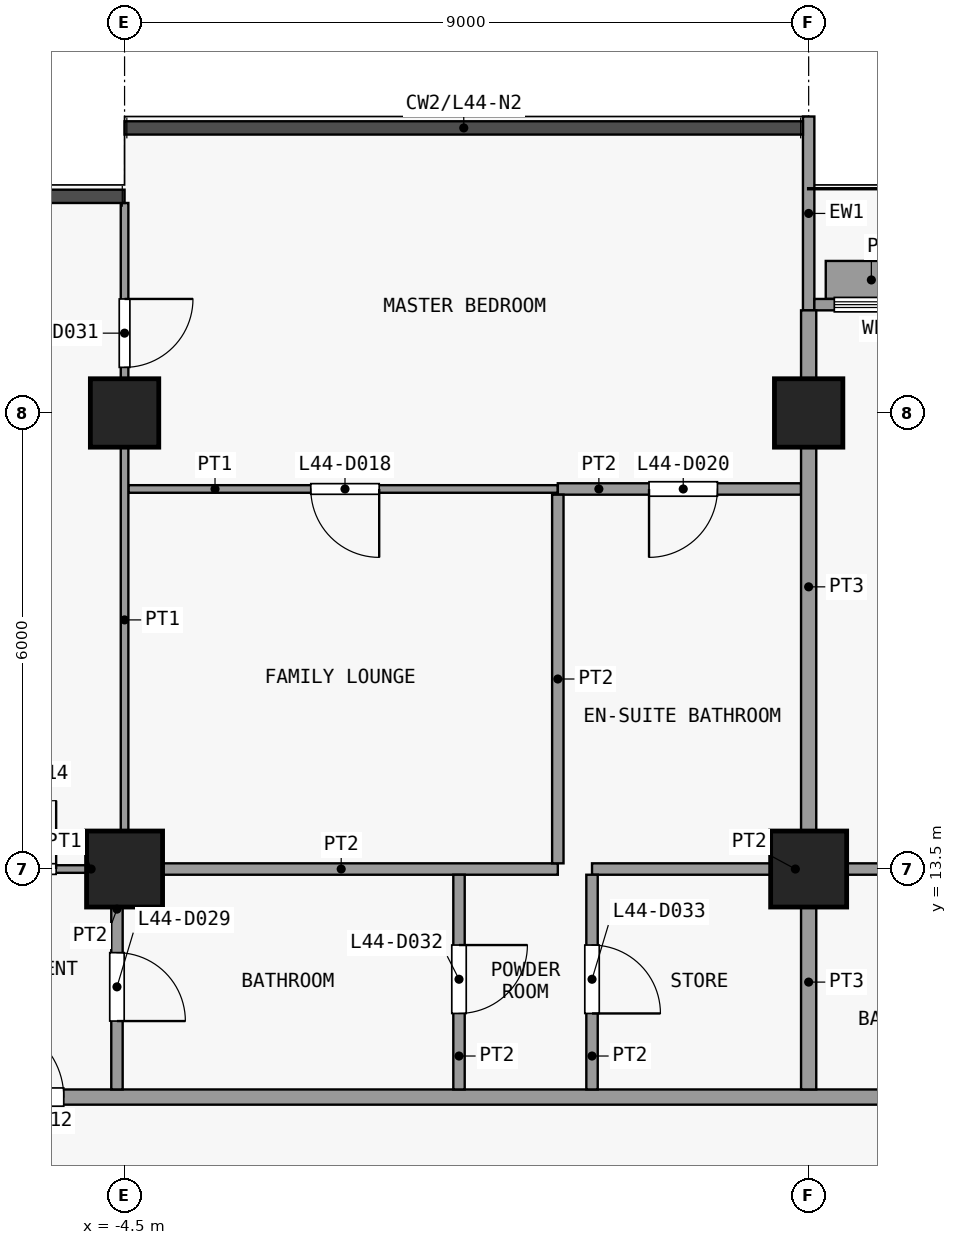
"""IFC4 building model, lengths in metres.
Left out: names, types, materials, properties, quantities, classifications, styles, units other than length and angle.
Written with IfcOpenShell. Run it as: python <this file> out.ifc"""

import sys

from ifc_helpers import new_model, si_unit, direction, frame, frame_2d, origin, origin_2d, place, context, subcontext, project, spatial, rectangle, extrude, element, fill, save


model = new_model("IFC4")
c1 = context("Model", 3, precision=1e-05, world=origin(), true_north=direction((0.0, 1.0)))
c2 = subcontext(c1, "Body", "Model", "MODEL_VIEW")
j1 = project(units=[si_unit("LENGTHUNIT", "METRE"), si_unit("PLANEANGLEUNIT", "RADIAN")], contexts=[c1])
p1 = place(None, origin())
s1 = spatial("IfcSite", under=j1, at=p1, CompositionType="ELEMENT")
p2 = place(p1, origin())
s2 = spatial("IfcBuilding", under=s1, at=p2, CompositionType="ELEMENT")
p3 = place(p2, frame((0.0, 0.0, 178.1)))
s3 = spatial("IfcBuildingStorey", under=s2, at=p3, CompositionType="ELEMENT", Elevation=178.1)
p4 = place(p3, frame((-4.5, 13.5, 0.0), z_axis=(0.0, 0.0, 1.0), x_axis=(1.0, 0.0, 0.0)))
e1 = element("IfcColumn", 1, at=p4, inside=s3, PredefinedType="COLUMN", context=c2, shape_type="SweptSolid", body=[
    extrude(rectangle(XDim=1.0, YDim=1.0, at=origin_2d()), origin(), (0.0, 0.0, 1.0), 3.6),
])
p5 = place(p3, frame((-4.5, 19.5, 0.0), z_axis=(0.0, 0.0, 1.0), x_axis=(1.0, 0.0, 0.0)))
e2 = element("IfcColumn", 2, at=p5, inside=s3, PredefinedType="COLUMN", context=c2, shape_type="SweptSolid", body=[
    extrude(rectangle(XDim=0.9, YDim=0.9, at=origin_2d()), origin(), (0.0, 0.0, 1.0), 3.6),
])
p6 = place(p3, frame((4.5, 13.5, 0.0), z_axis=(0.0, 0.0, 1.0), x_axis=(1.0, 0.0, 0.0)))
e3 = element("IfcColumn", 3, at=p6, inside=s3, PredefinedType="COLUMN", context=c2, shape_type="SweptSolid", body=[
    extrude(rectangle(XDim=1.0, YDim=1.0, at=origin_2d()), origin(), (0.0, 0.0, 1.0), 3.6),
])
p7 = place(p3, frame((4.5, 19.5, 0.0), z_axis=(0.0, 0.0, 1.0), x_axis=(1.0, 0.0, 0.0)))
e4 = element("IfcColumn", 4, at=p7, inside=s3, PredefinedType="COLUMN", context=c2, shape_type="SweptSolid", body=[
    extrude(rectangle(XDim=0.9, YDim=0.9, at=origin_2d()), origin(), (0.0, 0.0, 1.0), 3.6),
])
p8 = place(p3, frame((4.5, 20.85, 0.0), z_axis=(0.0, 0.0, 1.0), x_axis=(0.0, 1.0, 0.0)))
e5 = element("IfcWall", 5, at=p8, inside=s3, PredefinedType="SOLIDWALL", context=c2, shape_type="SweptSolid", body=[
    extrude(rectangle(XDim=2.55, YDim=0.15, at=frame_2d((1.275, 0.0))), origin(), (0.0, 0.0, 1.0), 3.3),
])
p9 = place(p3, frame((4.575, 20.925, 0.0), z_axis=(0.0, 0.0, 1.0), x_axis=(1.0, 0.0, 0.0)))
e6 = element("IfcWall", 6, at=p9, inside=s3, PredefinedType="SOLIDWALL", context=c2, shape_type="SweptSolid", body=[
    extrude(rectangle(XDim=5.85, YDim=0.15, at=frame_2d((2.925, 0.0))), origin(), (0.0, 0.0, 1.0), 3.3),
])
p10 = place(p9, frame((2.325, 0.0, 0.0)))
e7 = element("IfcOpeningElement", 7, at=p10, cuts=e6, PredefinedType="OPENING", context=c2, shape_type="SweptSolid", body=[
    extrude(rectangle(XDim=1.2, YDim=2.4, at=frame_2d((0.6, 1.2))), frame((0.0, 0.085, 0.0), z_axis=(0.0, -1.0, 0.0), x_axis=(1.0, 0.0, 0.0)), (0.0, 0.0, 1.0), 0.17),
])
p11 = place(p9, frame((0.262, 0.0, 0.9)))
e8 = element("IfcOpeningElement", 8, at=p11, cuts=e6, PredefinedType="OPENING", context=c2, shape_type="SweptSolid", body=[
    extrude(rectangle(XDim=1.8, YDim=2.1, at=frame_2d((0.9, 1.05))), frame((0.0, 0.085, 0.0), z_axis=(0.0, -1.0, 0.0), x_axis=(1.0, 0.0, 0.0)), (0.0, 0.0, 1.0), 0.17),
])
p12 = place(p9, frame((3.788, 0.0, 0.9)))
e9 = element("IfcOpeningElement", 9, at=p12, cuts=e6, PredefinedType="OPENING", context=c2, shape_type="SweptSolid", body=[
    extrude(rectangle(XDim=1.8, YDim=2.1, at=frame_2d((0.9, 1.05))), frame((0.0, 0.085, 0.0), z_axis=(0.0, -1.0, 0.0), x_axis=(1.0, 0.0, 0.0)), (0.0, 0.0, 1.0), 0.17),
])
p13 = place(p3, frame((4.725, 21.25, 0.0), z_axis=(0.0, 0.0, 1.0), x_axis=(1.0, 0.0, 0.0)))
e10 = element("IfcWall", 10, at=p13, inside=s3, PredefinedType="USERDEFINED", context=c2, shape_type="SweptSolid", body=[
    extrude(rectangle(XDim=1.2, YDim=0.5, at=frame_2d((0.6, 0.0))), origin(), (0.0, 0.0, 1.0), 0.9),
])
p14 = place(p3, frame((-19.35, 10.5, 0.0), z_axis=(0.0, 0.0, 1.0), x_axis=(1.0, 0.0, 0.0)))
e11 = element("IfcWall", 11, at=p14, inside=s3, PredefinedType="PARTITIONING", context=c2, shape_type="SweptSolid", body=[
    extrude(rectangle(XDim=37.2, YDim=0.2, at=frame_2d((18.6, 0.0))), origin(), (0.0, 0.0, 1.0), 3.3),
])
p15 = place(p14, frame((13.05, 0.0, 0.0)))
e12 = element("IfcOpeningElement", 12, at=p15, cuts=e11, PredefinedType="OPENING", context=c2, shape_type="SweptSolid", body=[
    extrude(rectangle(XDim=1.0, YDim=2.1, at=frame_2d((0.5, 1.05))), frame((0.0, 0.11, 0.0), z_axis=(0.0, -1.0, 0.0), x_axis=(1.0, 0.0, 0.0)), (0.0, 0.0, 1.0), 0.22),
])
p16 = place(p14, frame((27.05, 0.0, 0.0)))
e13 = element("IfcOpeningElement", 13, at=p16, cuts=e11, PredefinedType="OPENING", context=c2, shape_type="SweptSolid", body=[
    extrude(rectangle(XDim=1.0, YDim=2.1, at=frame_2d((0.5, 1.05))), frame((0.0, 0.11, 0.0), z_axis=(0.0, -1.0, 0.0), x_axis=(1.0, 0.0, 0.0)), (0.0, 0.0, 1.0), 0.22),
])
p17 = place(p3, frame((-7.0, 13.5, 0.0), z_axis=(0.0, 0.0, 1.0), x_axis=(1.0, 0.0, 0.0)))
e14 = element("IfcWall", 14, at=p17, inside=s3, PredefinedType="PARTITIONING", context=c2, shape_type="SweptSolid", body=[
    extrude(rectangle(XDim=2.4, YDim=0.1, at=frame_2d((1.2, 0.0))), origin(), (0.0, 0.0, 1.0), 3.3),
])
p18 = place(p17, frame((0.7, 0.0, 0.0)))
e15 = element("IfcOpeningElement", 15, at=p18, cuts=e14, PredefinedType="OPENING", context=c2, shape_type="SweptSolid", body=[
    extrude(rectangle(XDim=0.9, YDim=2.1, at=frame_2d((0.45, 1.05))), frame((0.0, 0.06, 0.0), z_axis=(0.0, -1.0, 0.0), x_axis=(1.0, 0.0, 0.0)), (0.0, 0.0, 1.0), 0.12),
])
p19 = place(p3, frame((-4.5, 13.5, 0.0), z_axis=(0.0, 0.0, 1.0), x_axis=(1.0, 0.0, 0.0)))
e16 = element("IfcWall", 16, at=p19, inside=s3, PredefinedType="PARTITIONING", context=c2, shape_type="SweptSolid", body=[
    extrude(rectangle(XDim=5.7, YDim=0.15, at=frame_2d((2.85, 0.0))), origin(), (0.0, 0.0, 1.0), 3.3),
])
p20 = place(p3, frame((1.65, 13.5, 0.0), z_axis=(0.0, 0.0, 1.0), x_axis=(1.0, 0.0, 0.0)))
e17 = element("IfcWall", 17, at=p20, inside=s3, PredefinedType="PARTITIONING", context=c2, shape_type="SweptSolid", body=[
    extrude(rectangle(XDim=5.35, YDim=0.15, at=frame_2d((2.675, 0.0))), origin(), (0.0, 0.0, 1.0), 3.3),
])
p21 = place(p3, frame((-4.45, 18.5, 0.0), z_axis=(0.0, 0.0, 1.0), x_axis=(1.0, 0.0, 0.0)))
e18 = element("IfcWall", 18, at=p21, inside=s3, PredefinedType="PARTITIONING", context=c2, shape_type="SweptSolid", body=[
    extrude(rectangle(XDim=5.65, YDim=0.1, at=frame_2d((2.825, 0.0))), origin(), (0.0, 0.0, 1.0), 3.3),
])
p22 = place(p21, frame((2.4, 0.0, 0.0)))
e19 = element("IfcOpeningElement", 19, at=p22, cuts=e18, PredefinedType="OPENING", context=c2, shape_type="SweptSolid", body=[
    extrude(rectangle(XDim=0.9, YDim=2.1, at=frame_2d((0.45, 1.05))), frame((0.0, 0.06, 0.0), z_axis=(0.0, -1.0, 0.0), x_axis=(1.0, 0.0, 0.0)), (0.0, 0.0, 1.0), 0.12),
])
p23 = place(p3, frame((1.2, 18.5, 0.0), z_axis=(0.0, 0.0, 1.0), x_axis=(1.0, 0.0, 0.0)))
e20 = element("IfcWall", 20, at=p23, inside=s3, PredefinedType="PARTITIONING", context=c2, shape_type="SweptSolid", body=[
    extrude(rectangle(XDim=3.2, YDim=0.15, at=frame_2d((1.6, 0.0))), origin(), (0.0, 0.0, 1.0), 3.3),
])
p24 = place(p23, frame((1.2, 0.0, 0.0)))
e21 = element("IfcOpeningElement", 21, at=p24, cuts=e20, PredefinedType="OPENING", context=c2, shape_type="SweptSolid", body=[
    extrude(rectangle(XDim=0.9, YDim=2.1, at=frame_2d((0.45, 1.05))), frame((0.0, 0.085, 0.0), z_axis=(0.0, -1.0, 0.0), x_axis=(1.0, 0.0, 0.0)), (0.0, 0.0, 1.0), 0.17),
])
p25 = place(p3, frame((-4.6, 10.6, 0.0), z_axis=(0.0, 0.0, 1.0), x_axis=(0.0, 1.0, 0.0)))
e22 = element("IfcWall", 22, at=p25, inside=s3, PredefinedType="PARTITIONING", context=c2, shape_type="SweptSolid", body=[
    extrude(rectangle(XDim=2.825, YDim=0.15, at=frame_2d((1.413, 0.0))), origin(), (0.0, 0.0, 1.0), 3.3),
])
p26 = place(p25, frame((0.9, 0.0, 0.0)))
e23 = element("IfcOpeningElement", 23, at=p26, cuts=e22, PredefinedType="OPENING", context=c2, shape_type="SweptSolid", body=[
    extrude(rectangle(XDim=0.9, YDim=2.1, at=frame_2d((0.45, 1.05))), frame((0.0, 0.085, 0.0), z_axis=(0.0, -1.0, 0.0), x_axis=(1.0, 0.0, 0.0)), (0.0, 0.0, 1.0), 0.17),
])
p27 = place(p3, frame((-4.5, 13.575, 0.0), z_axis=(0.0, 0.0, 1.0), x_axis=(0.0, 1.0, 0.0)))
e24 = element("IfcWall", 24, at=p27, inside=s3, PredefinedType="PARTITIONING", context=c2, shape_type="SweptSolid", body=[
    extrude(rectangle(XDim=8.688, YDim=0.1, at=frame_2d((4.344, 0.0))), origin(), (0.0, 0.0, 1.0), 3.3),
])
p28 = place(p27, frame((6.525, 0.0, 0.0)))
e25 = element("IfcOpeningElement", 25, at=p28, cuts=e24, PredefinedType="OPENING", context=c2, shape_type="SweptSolid", body=[
    extrude(rectangle(XDim=0.9, YDim=2.1, at=frame_2d((0.45, 1.05))), frame((0.0, 0.06, 0.0), z_axis=(0.0, -1.0, 0.0), x_axis=(1.0, 0.0, 0.0)), (0.0, 0.0, 1.0), 0.12),
])
p29 = place(p3, frame((-0.1, 10.6, 0.0), z_axis=(0.0, 0.0, 1.0), x_axis=(0.0, 1.0, 0.0)))
e26 = element("IfcWall", 26, at=p29, inside=s3, PredefinedType="PARTITIONING", context=c2, shape_type="SweptSolid", body=[
    extrude(rectangle(XDim=2.825, YDim=0.15, at=frame_2d((1.413, 0.0))), origin(), (0.0, 0.0, 1.0), 3.3),
])
p30 = place(p29, frame((1.0, 0.0, 0.0)))
e27 = element("IfcOpeningElement", 27, at=p30, cuts=e26, PredefinedType="OPENING", context=c2, shape_type="SweptSolid", body=[
    extrude(rectangle(XDim=0.9, YDim=2.1, at=frame_2d((0.45, 1.05))), frame((0.0, 0.085, 0.0), z_axis=(0.0, -1.0, 0.0), x_axis=(1.0, 0.0, 0.0)), (0.0, 0.0, 1.0), 0.17),
])
p31 = place(p3, frame((1.2, 13.575, 0.0), z_axis=(0.0, 0.0, 1.0), x_axis=(0.0, 1.0, 0.0)))
e28 = element("IfcWall", 28, at=p31, inside=s3, PredefinedType="PARTITIONING", context=c2, shape_type="SweptSolid", body=[
    extrude(rectangle(XDim=4.85, YDim=0.15, at=frame_2d((2.425, 0.0))), origin(), (0.0, 0.0, 1.0), 3.3),
])
p32 = place(p3, frame((1.65, 10.6, 0.0), z_axis=(0.0, 0.0, 1.0), x_axis=(0.0, 1.0, 0.0)))
e29 = element("IfcWall", 29, at=p32, inside=s3, PredefinedType="PARTITIONING", context=c2, shape_type="SweptSolid", body=[
    extrude(rectangle(XDim=2.825, YDim=0.15, at=frame_2d((1.413, 0.0))), origin(), (0.0, 0.0, 1.0), 3.3),
])
p33 = place(p32, frame((1.0, 0.0, 0.0)))
e30 = element("IfcOpeningElement", 30, at=p33, cuts=e29, PredefinedType="OPENING", context=c2, shape_type="SweptSolid", body=[
    extrude(rectangle(XDim=0.9, YDim=2.1, at=frame_2d((0.45, 1.05))), frame((0.0, 0.085, 0.0), z_axis=(0.0, -1.0, 0.0), x_axis=(1.0, 0.0, 0.0)), (0.0, 0.0, 1.0), 0.17),
])
p34 = place(p3, frame((4.5, 10.6, 0.0), z_axis=(0.0, 0.0, 1.0), x_axis=(0.0, 1.0, 0.0)))
e31 = element("IfcWall", 31, at=p34, inside=s3, PredefinedType="PARTITIONING", context=c2, shape_type="SweptSolid", body=[
    extrude(rectangle(XDim=2.825, YDim=0.2, at=frame_2d((1.413, 0.0))), origin(), (0.0, 0.0, 1.0), 3.3),
])
p35 = place(p3, frame((4.5, 13.575, 0.0), z_axis=(0.0, 0.0, 1.0), x_axis=(0.0, 1.0, 0.0)))
e32 = element("IfcWall", 32, at=p35, inside=s3, PredefinedType="PARTITIONING", context=c2, shape_type="SweptSolid", body=[
    extrude(rectangle(XDim=7.275, YDim=0.2, at=frame_2d((3.638, 0.0))), origin(), (0.0, 0.0, 1.0), 3.3),
])
p36 = place(p11, origin())
e33 = element("IfcWindow", 33, at=p36, inside=s3, PartitioningType="SINGLE_PANEL", PredefinedType="WINDOW", context=c2, shape_type="SweptSolid", body=[
    extrude(rectangle(XDim=1.8, YDim=2.1, at=frame_2d((0.9, 1.05))), frame((0.0, 0.03, 0.0), z_axis=(0.0, -1.0, 0.0), x_axis=(1.0, 0.0, 0.0)), (0.0, 0.0, 1.0), 0.06),
])
fill(e8, e33)
p37 = place(p15, origin())
e34 = element("IfcDoor", 34, at=p37, inside=s3, OperationType="SINGLE_SWING_RIGHT", PredefinedType="DOOR", context=c2, shape_type="SweptSolid", body=[
    extrude(rectangle(XDim=1.0, YDim=2.1, at=frame_2d((0.5, 1.05))), frame((0.0, 0.025, 0.0), z_axis=(0.0, -1.0, 0.0), x_axis=(1.0, 0.0, 0.0)), (0.0, 0.0, 1.0), 0.05),
])
fill(e12, e34)
p38 = place(p18, origin())
e35 = element("IfcDoor", 35, at=p38, inside=s3, OperationType="SINGLE_SWING_LEFT", PredefinedType="DOOR", context=c2, shape_type="SweptSolid", body=[
    extrude(rectangle(XDim=0.9, YDim=2.1, at=frame_2d((0.45, 1.05))), frame((0.0, 0.025, 0.0), z_axis=(0.0, -1.0, 0.0), x_axis=(1.0, 0.0, 0.0)), (0.0, 0.0, 1.0), 0.05),
])
fill(e15, e35)
p39 = place(p22, origin())
e36 = element("IfcDoor", 36, at=p39, inside=s3, OperationType="SINGLE_SWING_RIGHT", PredefinedType="DOOR", context=c2, shape_type="SweptSolid", body=[
    extrude(rectangle(XDim=0.9, YDim=2.1, at=frame_2d((0.45, 1.05))), frame((0.0, 0.025, 0.0), z_axis=(0.0, -1.0, 0.0), x_axis=(1.0, 0.0, 0.0)), (0.0, 0.0, 1.0), 0.05),
])
fill(e19, e36)
p40 = place(p24, origin())
e37 = element("IfcDoor", 37, at=p40, inside=s3, OperationType="SINGLE_SWING_LEFT", PredefinedType="DOOR", context=c2, shape_type="SweptSolid", body=[
    extrude(rectangle(XDim=0.9, YDim=2.1, at=frame_2d((0.45, 1.05))), frame((0.0, 0.025, 0.0), z_axis=(0.0, -1.0, 0.0), x_axis=(1.0, 0.0, 0.0)), (0.0, 0.0, 1.0), 0.05),
])
fill(e21, e37)
p41 = place(p26, origin())
e38 = element("IfcDoor", 38, at=p41, inside=s3, OperationType="SINGLE_SWING_LEFT", PredefinedType="DOOR", context=c2, shape_type="SweptSolid", body=[
    extrude(rectangle(XDim=0.9, YDim=2.1, at=frame_2d((0.45, 1.05))), frame((0.0, 0.025, 0.0), z_axis=(0.0, -1.0, 0.0), x_axis=(1.0, 0.0, 0.0)), (0.0, 0.0, 1.0), 0.05),
])
fill(e23, e38)
p42 = place(p28, origin())
e39 = element("IfcDoor", 39, at=p42, inside=s3, OperationType="SINGLE_SWING_RIGHT", PredefinedType="DOOR", context=c2, shape_type="SweptSolid", body=[
    extrude(rectangle(XDim=0.9, YDim=2.1, at=frame_2d((0.45, 1.05))), frame((0.0, 0.025, 0.0), z_axis=(0.0, -1.0, 0.0), x_axis=(1.0, 0.0, 0.0)), (0.0, 0.0, 1.0), 0.05),
])
fill(e25, e39)
p43 = place(p30, origin())
e40 = element("IfcDoor", 40, at=p43, inside=s3, OperationType="SINGLE_SWING_RIGHT", PredefinedType="DOOR", context=c2, shape_type="SweptSolid", body=[
    extrude(rectangle(XDim=0.9, YDim=2.1, at=frame_2d((0.45, 1.05))), frame((0.0, 0.025, 0.0), z_axis=(0.0, -1.0, 0.0), x_axis=(1.0, 0.0, 0.0)), (0.0, 0.0, 1.0), 0.05),
])
fill(e27, e40)
p44 = place(p33, origin())
e41 = element("IfcDoor", 41, at=p44, inside=s3, OperationType="SINGLE_SWING_LEFT", PredefinedType="DOOR", context=c2, shape_type="SweptSolid", body=[
    extrude(rectangle(XDim=0.9, YDim=2.1, at=frame_2d((0.45, 1.05))), frame((0.0, 0.025, 0.0), z_axis=(0.0, -1.0, 0.0), x_axis=(1.0, 0.0, 0.0)), (0.0, 0.0, 1.0), 0.05),
])
fill(e30, e41)
save(model, sys.argv[1])
